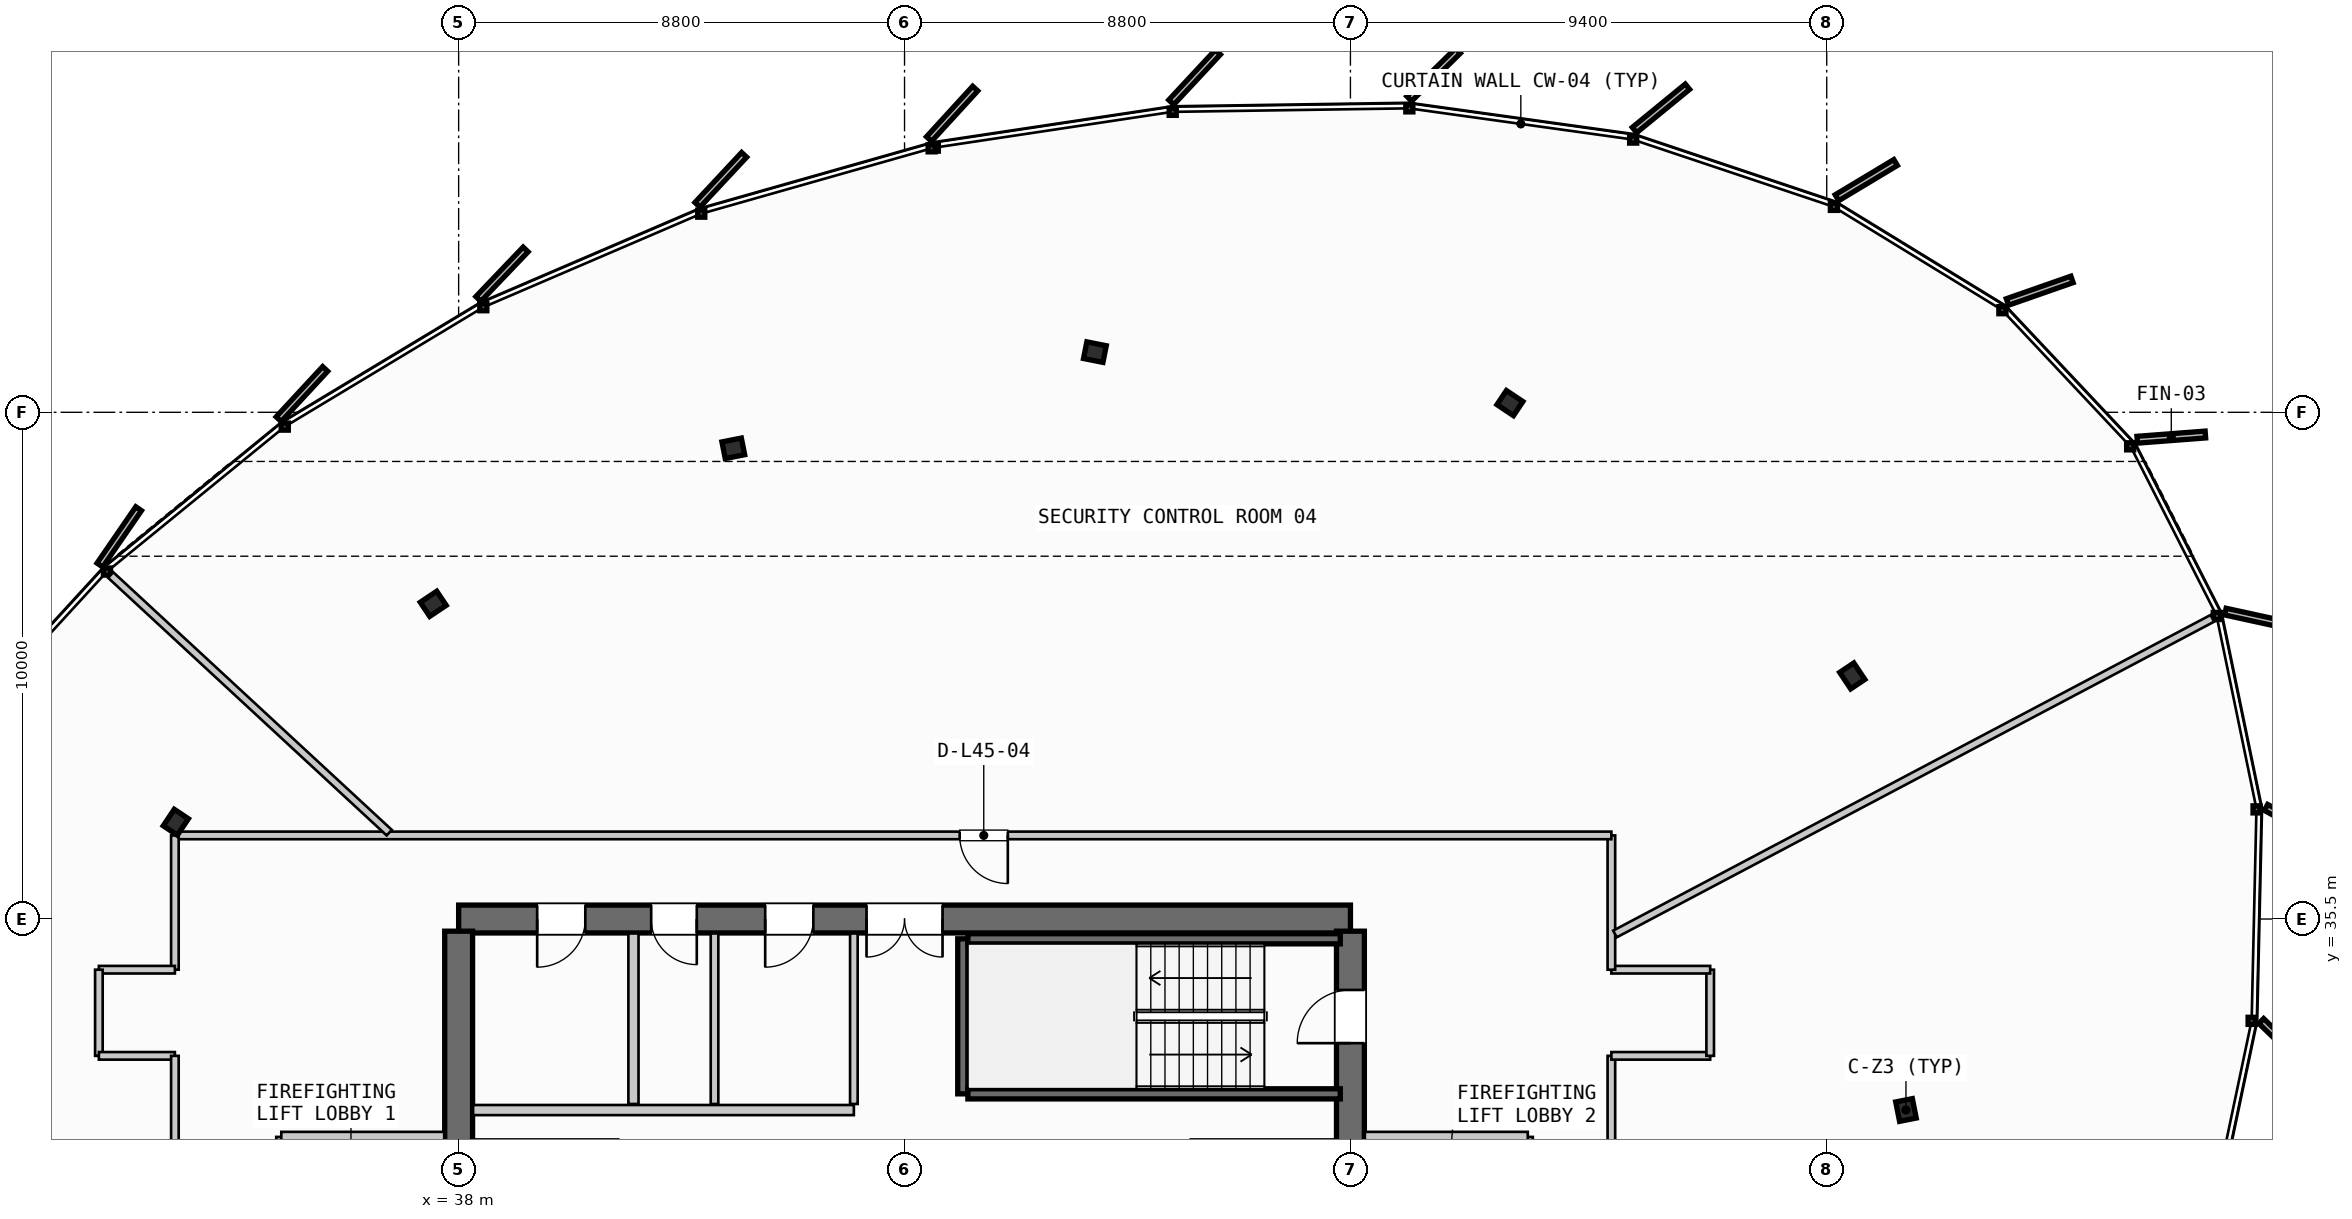
"""IFC4 building model, lengths in metres.
Left out: names, types, materials, properties, quantities, classifications, styles, units other than length and angle.
Written with IfcOpenShell. Run it as: python <this file> out.ifc"""

import sys

from ifc_helpers import new_model, si_unit, direction, frame, frame_2d, origin, origin_2d, place, context, subcontext, project, spatial, rectangle, i_section, extrude, source, transform, mapped, element, fill, save


model = new_model("IFC4")
c1 = context("Model", 3, precision=1e-05, world=origin(), true_north=direction((0.0, 1.0)))
c2 = subcontext(c1, "Body", "Model", "MODEL_VIEW")
j1 = project(units=[si_unit("LENGTHUNIT", "METRE"), si_unit("PLANEANGLEUNIT", "RADIAN")], contexts=[c1])
p1 = place(None, origin())
s1 = spatial("IfcSite", under=j1, at=p1, CompositionType="ELEMENT")
p2 = place(p1, origin())
s2 = spatial("IfcBuilding", under=s1, at=p2, CompositionType="ELEMENT")
p3 = place(p2, frame((0.0, 0.0, 176.4)))
s3 = spatial("IfcBuildingStorey", under=s2, at=p3, CompositionType="ELEMENT", Elevation=176.4)
p4 = place(p3, frame((55.6, 35.5, 0.0), z_axis=(0.0, 0.0, 1.0), x_axis=(-1.0, 0.0, 0.0)))
e1 = element("IfcWall", 1, at=p4, inside=s3, PredefinedType="SHEAR", context=c2, shape_type="SweptSolid", body=[
    extrude(rectangle(XDim=17.6, YDim=0.55, at=frame_2d((8.8, 0.0))), origin(), (0.0, 0.0, 1.0), 3.26),
])
p5 = place(p4, frame((8.05, 0.0, 0.0)))
e2 = element("IfcOpeningElement", 2, at=p5, cuts=e1, PredefinedType="OPENING", context=c2, shape_type="SweptSolid", body=[
    extrude(rectangle(XDim=1.5, YDim=2.2, at=frame_2d((0.75, 1.1))), frame((0.0, 0.285, 0.0), z_axis=(0.0, -1.0, 0.0), x_axis=(1.0, 0.0, 0.0)), (0.0, 0.0, 1.0), 0.57),
])
p6 = place(p4, frame((15.1, 0.0, 0.0)))
e3 = element("IfcOpeningElement", 3, at=p6, cuts=e1, PredefinedType="OPENING", context=c2, shape_type="SweptSolid", body=[
    extrude(rectangle(XDim=0.95, YDim=2.15, at=frame_2d((0.475, 1.075))), frame((0.0, 0.285, 0.0), z_axis=(0.0, -1.0, 0.0), x_axis=(1.0, 0.0, 0.0)), (0.0, 0.0, 1.0), 0.57),
])
p7 = place(p4, frame((12.9, 0.0, 0.0)))
e4 = element("IfcOpeningElement", 4, at=p7, cuts=e1, PredefinedType="OPENING", context=c2, shape_type="SweptSolid", body=[
    extrude(rectangle(XDim=0.9, YDim=2.15, at=frame_2d((0.45, 1.075))), frame((0.0, 0.285, 0.0), z_axis=(0.0, -1.0, 0.0), x_axis=(1.0, 0.0, 0.0)), (0.0, 0.0, 1.0), 0.57),
])
p8 = place(p4, frame((10.6, 0.0, 0.0)))
e5 = element("IfcOpeningElement", 5, at=p8, cuts=e1, PredefinedType="OPENING", context=c2, shape_type="SweptSolid", body=[
    extrude(rectangle(XDim=0.95, YDim=2.15, at=frame_2d((0.475, 1.075))), frame((0.0, 0.285, 0.0), z_axis=(0.0, -1.0, 0.0), x_axis=(1.0, 0.0, 0.0)), (0.0, 0.0, 1.0), 0.57),
])
p9 = place(p3, frame((38.0, 35.26, 0.0), z_axis=(0.0, 0.0, 1.0), x_axis=(0.0, -1.0, 0.0)))
e6 = element("IfcWall", 6, at=p9, inside=s3, PredefinedType="SHEAR", context=c2, shape_type="SweptSolid", body=[
    extrude(rectangle(XDim=14.92, YDim=0.55, at=frame_2d((7.46, 0.0))), origin(), (0.0, 0.0, 1.0), 3.26),
])
p10 = place(p9, frame((5.21, 0.0, 0.0)))
e7 = element("IfcOpeningElement", 7, at=p10, cuts=e6, PredefinedType="OPENING", context=c2, shape_type="SweptSolid", body=[
    extrude(rectangle(XDim=1.1, YDim=2.2, at=frame_2d((0.55, 1.1))), frame((0.0, 0.285, 0.0), z_axis=(0.0, -1.0, 0.0), x_axis=(1.0, 0.0, 0.0)), (0.0, 0.0, 1.0), 0.57),
])
p11 = place(p3, frame((55.6, 20.34, 0.0), z_axis=(0.0, 0.0, 1.0), x_axis=(0.0, 1.0, 0.0)))
e8 = element("IfcWall", 8, at=p11, inside=s3, PredefinedType="SHEAR", context=c2, shape_type="SweptSolid", body=[
    extrude(rectangle(XDim=14.92, YDim=0.55, at=frame_2d((7.46, 0.0))), origin(), (0.0, 0.0, 1.0), 3.26),
])
p12 = place(p11, frame((12.71, 0.0, 0.0)))
e9 = element("IfcOpeningElement", 9, at=p12, cuts=e8, PredefinedType="OPENING", context=c2, shape_type="SweptSolid", body=[
    extrude(rectangle(XDim=1.05, YDim=2.15, at=frame_2d((0.525, 1.075))), frame((0.0, 0.285, 0.0), z_axis=(0.0, -1.0, 0.0), x_axis=(1.0, 0.0, 0.0)), (0.0, 0.0, 1.0), 0.57),
])
p13 = place(p11, frame((8.61, 0.0, 0.0)))
e10 = element("IfcOpeningElement", 10, at=p13, cuts=e8, PredefinedType="OPENING", context=c2, shape_type="SweptSolid", body=[
    extrude(rectangle(XDim=1.1, YDim=2.2, at=frame_2d((0.55, 1.1))), frame((0.0, 0.285, 0.0), z_axis=(0.0, -1.0, 0.0), x_axis=(1.0, 0.0, 0.0)), (0.0, 0.0, 1.0), 0.57),
])
m1 = source(origin(), c2, "Body", "SweptSolid", [
    extrude(i_section(OverallWidth=0.391, OverallDepth=0.335, WebThickness=0.023, FlangeThickness=0.034, FilletRadius=0.015, at=origin_2d()), origin(), (0.0, 0.0, 1.0), 3.26),
])
for number, where, z_axis, x_axis in (
    (11, (66.564, 31.731, 0.0), (0.0, 0.0, 1.0), (0.981, 0.195, 0.0)),
    (12, (65.504, 40.298, 0.0), (0.0, 0.0, 1.0), (0.831, 0.556, 0.0)),
    (13, (58.748, 45.681, 0.0), (0.0, 0.0, 1.0), (0.556, 0.831, 0.0)),
    (14, (50.557, 46.688, 0.0), (0.0, 0.0, 1.0), (0.195, 0.981, 0.0)),
    (15, (43.421, 44.789, 0.0), (0.0, 0.0, 1.0), (-0.195, 0.981, 0.0)),
    (16, (37.499, 41.72, 0.0), (0.0, 0.0, 1.0), (-0.556, 0.831, 0.0)),
    (17, (32.418, 37.409, 0.0), (0.0, 0.0, 1.0), (-0.831, 0.556, 0.0)),
):
    element("IfcColumn", number, at=place(p3, frame(where, z_axis=z_axis, x_axis=x_axis)), inside=s3, PredefinedType="COLUMN", context=c2, shape_type="MappedRepresentation", body=[
        mapped(m1, transform((0.0, 0.0, 0.0), scale=1.0)),
    ])
p14 = place(p3, frame((47.95, 32.05, 0.0), z_axis=(0.0, 0.0, 1.0), x_axis=(0.0, 1.0, 0.0)))
e18 = element("IfcWall", 18, at=p14, inside=s3, PredefinedType="SHEAR", context=c2, shape_type="SweptSolid", body=[
    extrude(rectangle(XDim=3.06, YDim=0.2, at=frame_2d((1.53, 0.0))), origin(), (0.0, 0.0, 1.0), 3.26),
])
for number, where, z_axis, x_axis in (
    (19, (48.05, 35.11, 0.0), (0.0, 0.0, 1.0), (1.0, 0.0, 0.0)),
    (20, (55.4, 32.05, 0.0), (0.0, 0.0, 1.0), (-1.0, 0.0, 0.0)),
):
    element("IfcWall", number, at=place(p3, frame(where, z_axis=z_axis, x_axis=x_axis)), inside=s3, PredefinedType="SHEAR", context=c2, shape_type="SweptSolid", body=[
        extrude(rectangle(XDim=7.35, YDim=0.2, at=frame_2d((3.675, 0.0))), origin(), (0.0, 0.0, 1.0), 3.26),
    ])
p15 = place(p3, frame((38.285, 31.05, 0.0), z_axis=(0.0, 0.0, 1.0), x_axis=(1.0, 0.0, 0.0)))
e21 = element("IfcWall", 21, at=p15, inside=s3, PredefinedType="PARTITIONING", context=c2, shape_type="SweptSolid", body=[
    extrude(rectangle(XDim=2.865, YDim=0.2, at=frame_2d((1.433, 0.0))), origin(), (0.0, 0.0, 1.0), 2.28),
])
p16 = place(p3, frame((34.5, 31.2, 0.0), z_axis=(0.0, 0.0, 1.0), x_axis=(0.0, -1.0, 0.0)))
e22 = element("IfcWall", 22, at=p16, inside=s3, PredefinedType="PARTITIONING", context=c2, shape_type="SweptSolid", body=[
    extrude(rectangle(XDim=4.4, YDim=0.2, at=frame_2d((2.2, 0.0))), origin(), (0.0, 0.0, 1.0), 2.28),
])
p17 = place(p16, frame((1.65, 0.0, 0.0)))
e23 = element("IfcOpeningElement", 23, at=p17, cuts=e22, PredefinedType="OPENING", context=c2, shape_type="SweptSolid", body=[
    extrude(rectangle(XDim=1.05, YDim=2.15, at=frame_2d((0.525, 1.075))), frame((0.0, 0.11, 0.0), z_axis=(0.0, -1.0, 0.0), x_axis=(1.0, 0.0, 0.0)), (0.0, 0.0, 1.0), 0.22),
])
p18 = place(p3, frame((34.5, 31.2, 0.0), z_axis=(0.0, 0.0, 1.0), x_axis=(1.0, 0.0, 0.0)))
e24 = element("IfcWall", 24, at=p18, inside=s3, PredefinedType="PARTITIONING", context=c2, shape_type="SweptSolid", body=[
    extrude(rectangle(XDim=3.215, YDim=0.2, at=frame_2d((1.607, 0.0))), origin(), (0.0, 0.0, 1.0), 2.28),
])
p19 = place(p3, frame((52.45, 31.05, 0.0), z_axis=(0.0, 0.0, 1.0), x_axis=(1.0, 0.0, 0.0)))
e25 = element("IfcWall", 25, at=p19, inside=s3, PredefinedType="PARTITIONING", context=c2, shape_type="SweptSolid", body=[
    extrude(rectangle(XDim=2.865, YDim=0.2, at=frame_2d((1.433, 0.0))), origin(), (0.0, 0.0, 1.0), 2.28),
])
p20 = place(p3, frame((59.1, 26.8, 0.0), z_axis=(0.0, 0.0, 1.0), x_axis=(0.0, 1.0, 0.0)))
e26 = element("IfcWall", 26, at=p20, inside=s3, PredefinedType="PARTITIONING", context=c2, shape_type="SweptSolid", body=[
    extrude(rectangle(XDim=4.4, YDim=0.2, at=frame_2d((2.2, 0.0))), origin(), (0.0, 0.0, 1.0), 2.28),
])
p21 = place(p20, frame((1.65, 0.0, 0.0)))
e27 = element("IfcOpeningElement", 27, at=p21, cuts=e26, PredefinedType="OPENING", context=c2, shape_type="SweptSolid", body=[
    extrude(rectangle(XDim=1.05, YDim=2.15, at=frame_2d((0.525, 1.075))), frame((0.0, 0.11, 0.0), z_axis=(0.0, -1.0, 0.0), x_axis=(1.0, 0.0, 0.0)), (0.0, 0.0, 1.0), 0.22),
])
p22 = place(p3, frame((55.885, 31.2, 0.0), z_axis=(0.0, 0.0, 1.0), x_axis=(1.0, 0.0, 0.0)))
e28 = element("IfcWall", 28, at=p22, inside=s3, PredefinedType="PARTITIONING", context=c2, shape_type="SweptSolid", body=[
    extrude(rectangle(XDim=3.215, YDim=0.2, at=frame_2d((1.607, 0.0))), origin(), (0.0, 0.0, 1.0), 2.28),
])
p23 = place(p3, frame((41.45, 31.85, 0.0), z_axis=(0.0, 0.0, 1.0), x_axis=(0.0, 1.0, 0.0)))
e29 = element("IfcWall", 29, at=p23, inside=s3, PredefinedType="PARTITIONING", context=c2, shape_type="SweptSolid", body=[
    extrude(rectangle(XDim=3.365, YDim=0.2, at=frame_2d((1.683, 0.0))), origin(), (0.0, 0.0, 1.0), 2.28),
])
p24 = place(p3, frame((38.285, 31.73, 0.0), z_axis=(0.0, 0.0, 1.0), x_axis=(1.0, 0.0, 0.0)))
e30 = element("IfcWall", 30, at=p24, inside=s3, PredefinedType="PARTITIONING", context=c2, shape_type="SweptSolid", body=[
    extrude(rectangle(XDim=7.515, YDim=0.2, at=frame_2d((3.758, 0.0))), origin(), (0.0, 0.0, 1.0), 2.28),
])
p25 = place(p3, frame((45.8, 31.85, 0.0), z_axis=(0.0, 0.0, 1.0), x_axis=(0.0, 1.0, 0.0)))
e31 = element("IfcWall", 31, at=p25, inside=s3, PredefinedType="PARTITIONING", context=c2, shape_type="SweptSolid", body=[
    extrude(rectangle(XDim=3.365, YDim=0.15, at=frame_2d((1.683, 0.0))), origin(), (0.0, 0.0, 1.0), 2.28),
])
p26 = place(p3, frame((43.05, 31.85, 0.0), z_axis=(0.0, 0.0, 1.0), x_axis=(0.0, 1.0, 0.0)))
e32 = element("IfcWall", 32, at=p26, inside=s3, PredefinedType="PLUMBINGWALL", context=c2, shape_type="SweptSolid", body=[
    extrude(rectangle(XDim=3.365, YDim=0.15, at=frame_2d((1.683, 0.0))), origin(), (0.0, 0.0, 1.0), 2.28),
])
p27 = place(p3, frame((60.75, 22.8, 0.0), z_axis=(0.0, 0.0, 1.0), x_axis=(0.0, 1.0, 0.0)))
e33 = element("IfcWall", 33, at=p27, inside=s3, PredefinedType="PARTITIONING", context=c2, shape_type="SweptSolid", body=[
    extrude(rectangle(XDim=10.0, YDim=0.15, at=frame_2d((5.0, 0.0))), origin(), (0.0, 0.0, 1.0), 2.28),
])
p28 = place(p27, frame((4.525, 0.0, 0.0)))
e34 = element("IfcOpeningElement", 34, at=p28, cuts=e33, PredefinedType="OPENING", context=c2, shape_type="SweptSolid", body=[
    extrude(rectangle(XDim=0.95, YDim=2.15, at=frame_2d((0.475, 1.075))), frame((0.0, 0.085, 0.0), z_axis=(0.0, -1.0, 0.0), x_axis=(1.0, 0.0, 0.0)), (0.0, 0.0, 1.0), 0.17),
])
p29 = place(p3, frame((60.75, 32.8, 0.0), z_axis=(0.0, 0.0, 1.0), x_axis=(1.0, 0.0, 0.0)))
e35 = element("IfcWall", 35, at=p29, inside=s3, PredefinedType="PARTITIONING", context=c2, shape_type="SweptSolid", body=[
    extrude(rectangle(XDim=1.95, YDim=0.15, at=frame_2d((0.975, 0.0))), origin(), (0.0, 0.0, 1.0), 2.28),
])
p30 = place(p3, frame((62.7, 32.8, 0.0), z_axis=(0.0, 0.0, 1.0), x_axis=(0.0, 1.0, 0.0)))
e36 = element("IfcWall", 36, at=p30, inside=s3, PredefinedType="PARTITIONING", context=c2, shape_type="SweptSolid", body=[
    extrude(rectangle(XDim=1.7, YDim=0.15, at=frame_2d((0.85, 0.0))), origin(), (0.0, 0.0, 1.0), 2.28),
])
p31 = place(p3, frame((62.7, 34.5, 0.0), z_axis=(0.0, 0.0, 1.0), x_axis=(-1.0, 0.0, 0.0)))
e37 = element("IfcWall", 37, at=p31, inside=s3, PredefinedType="PARTITIONING", context=c2, shape_type="SweptSolid", body=[
    extrude(rectangle(XDim=1.95, YDim=0.15, at=frame_2d((0.975, 0.0))), origin(), (0.0, 0.0, 1.0), 2.28),
])
p32 = place(p3, frame((60.75, 34.5, 0.0), z_axis=(0.0, 0.0, 1.0), x_axis=(0.0, 1.0, 0.0)))
e38 = element("IfcWall", 38, at=p32, inside=s3, PredefinedType="PARTITIONING", context=c2, shape_type="SweptSolid", body=[
    extrude(rectangle(XDim=2.65, YDim=0.15, at=frame_2d((1.325, 0.0))), origin(), (0.0, 0.0, 1.0), 2.28),
])
p33 = place(p3, frame((60.75, 37.15, 0.0), z_axis=(0.0, 0.0, 1.0), x_axis=(-1.0, 0.0, 0.0)))
e39 = element("IfcWall", 39, at=p33, inside=s3, PredefinedType="PARTITIONING", context=c2, shape_type="SweptSolid", body=[
    extrude(rectangle(XDim=28.35, YDim=0.15, at=frame_2d((14.175, 0.0))), origin(), (0.0, 0.0, 1.0), 2.28),
])
p34 = place(p33, frame((11.912, 0.0, 0.0)))
e40 = element("IfcOpeningElement", 40, at=p34, cuts=e39, PredefinedType="OPENING", context=c2, shape_type="SweptSolid", body=[
    extrude(rectangle(XDim=0.95, YDim=2.15, at=frame_2d((0.475, 1.075))), frame((0.0, 0.085, 0.0), z_axis=(0.0, -1.0, 0.0), x_axis=(1.0, 0.0, 0.0)), (0.0, 0.0, 1.0), 0.17),
])
p35 = place(p3, frame((32.4, 37.15, 0.0), z_axis=(0.0, 0.0, 1.0), x_axis=(0.0, -1.0, 0.0)))
e41 = element("IfcWall", 41, at=p35, inside=s3, PredefinedType="PARTITIONING", context=c2, shape_type="SweptSolid", body=[
    extrude(rectangle(XDim=2.65, YDim=0.15, at=frame_2d((1.325, 0.0))), origin(), (0.0, 0.0, 1.0), 2.28),
])
p36 = place(p3, frame((32.4, 34.5, 0.0), z_axis=(0.0, 0.0, 1.0), x_axis=(-1.0, 0.0, 0.0)))
e42 = element("IfcWall", 42, at=p36, inside=s3, PredefinedType="PARTITIONING", context=c2, shape_type="SweptSolid", body=[
    extrude(rectangle(XDim=1.5, YDim=0.15, at=frame_2d((0.75, 0.0))), origin(), (0.0, 0.0, 1.0), 2.28),
])
p37 = place(p3, frame((30.9, 34.5, 0.0), z_axis=(0.0, 0.0, 1.0), x_axis=(0.0, -1.0, 0.0)))
e43 = element("IfcWall", 43, at=p37, inside=s3, PredefinedType="PARTITIONING", context=c2, shape_type="SweptSolid", body=[
    extrude(rectangle(XDim=1.7, YDim=0.15, at=frame_2d((0.85, 0.0))), origin(), (0.0, 0.0, 1.0), 2.28),
])
p38 = place(p3, frame((30.9, 32.8, 0.0), z_axis=(0.0, 0.0, 1.0), x_axis=(1.0, 0.0, 0.0)))
e44 = element("IfcWall", 44, at=p38, inside=s3, PredefinedType="PARTITIONING", context=c2, shape_type="SweptSolid", body=[
    extrude(rectangle(XDim=1.5, YDim=0.15, at=frame_2d((0.75, 0.0))), origin(), (0.0, 0.0, 1.0), 2.28),
])
p39 = place(p3, frame((32.4, 32.8, 0.0), z_axis=(0.0, 0.0, 1.0), x_axis=(0.0, -1.0, 0.0)))
e45 = element("IfcWall", 45, at=p39, inside=s3, PredefinedType="PARTITIONING", context=c2, shape_type="SweptSolid", body=[
    extrude(rectangle(XDim=10.0, YDim=0.15, at=frame_2d((5.0, 0.0))), origin(), (0.0, 0.0, 1.0), 2.28),
])
p40 = place(p39, frame((4.525, 0.0, 0.0)))
e46 = element("IfcOpeningElement", 46, at=p40, cuts=e45, PredefinedType="OPENING", context=c2, shape_type="SweptSolid", body=[
    extrude(rectangle(XDim=0.95, YDim=2.15, at=frame_2d((0.475, 1.075))), frame((0.0, 0.085, 0.0), z_axis=(0.0, -1.0, 0.0), x_axis=(1.0, 0.0, 0.0)), (0.0, 0.0, 1.0), 0.17),
])
p41 = place(p3, frame((60.821, 35.205, 0.0), z_axis=(0.0, 0.0, 1.0), x_axis=(0.884187105587, 0.467132917181, 0.0)))
e47 = element("IfcWall", 47, at=p41, inside=s3, PredefinedType="PARTITIONING", context=c2, shape_type="SweptSolid", body=[
    extrude(rectangle(XDim=13.333, YDim=0.15, at=frame_2d((6.667, 0.0))), origin(), (0.0, 0.0, 1.0), 2.28),
])
p42 = place(p3, frame((36.63, 37.204, 0.0), z_axis=(0.0, 0.0, 1.0), x_axis=(-0.734135600116, 0.679002887064, 0.0)))
e48 = element("IfcWall", 48, at=p42, inside=s3, PredefinedType="PARTITIONING", context=c2, shape_type="SweptSolid", body=[
    extrude(rectangle(XDim=7.488, YDim=0.15, at=frame_2d((3.744, 0.0))), origin(), (0.0, 0.0, 1.0), 2.28),
])
m2 = source(origin(), c2, "Body", "SweptSolid", [
    extrude(rectangle(XDim=1.05, YDim=2.15, at=frame_2d((0.525, 1.075))), frame((0.0, 0.025, 0.0), z_axis=(0.0, -1.0, 0.0), x_axis=(1.0, 0.0, 0.0)), (0.0, 0.0, 1.0), 0.05),
])
p43 = place(p12, origin())
e49 = element("IfcDoor", 49, at=p43, inside=s3, OperationType="SINGLE_SWING_LEFT", PredefinedType="DOOR", context=c2, shape_type="MappedRepresentation", body=[
    mapped(m2, transform((0.0, 0.0, 0.0), scale=1.0)),
])
fill(e9, e49)
m3 = source(origin(), c2, "Body", "SweptSolid", [
    extrude(rectangle(XDim=1.5, YDim=2.2, at=frame_2d((0.75, 1.1))), frame((0.0, 0.025, 0.0), z_axis=(0.0, -1.0, 0.0), x_axis=(1.0, 0.0, 0.0)), (0.0, 0.0, 1.0), 0.05),
])
p44 = place(p5, origin())
e50 = element("IfcDoor", 50, at=p44, inside=s3, OperationType="DOUBLE_DOOR_SINGLE_SWING", PredefinedType="DOOR", context=c2, shape_type="MappedRepresentation", body=[
    mapped(m3, transform((0.0, 0.0, 0.0), scale=1.0)),
])
fill(e2, e50)
m4 = source(origin(), c2, "Body", "SweptSolid", [
    extrude(rectangle(XDim=0.95, YDim=2.15, at=frame_2d((0.475, 1.075))), frame((0.0, 0.025, 0.0), z_axis=(0.0, -1.0, 0.0), x_axis=(1.0, 0.0, 0.0)), (0.0, 0.0, 1.0), 0.05),
])
p45 = place(p6, origin())
e51 = element("IfcDoor", 51, at=p45, inside=s3, OperationType="SINGLE_SWING_RIGHT", PredefinedType="DOOR", context=c2, shape_type="MappedRepresentation", body=[
    mapped(m4, transform((0.0, 0.0, 0.0), scale=1.0)),
])
fill(e3, e51)
m5 = source(origin(), c2, "Body", "SweptSolid", [
    extrude(rectangle(XDim=0.9, YDim=2.15, at=frame_2d((0.45, 1.075))), frame((0.0, 0.025, 0.0), z_axis=(0.0, -1.0, 0.0), x_axis=(1.0, 0.0, 0.0)), (0.0, 0.0, 1.0), 0.05),
])
p46 = place(p7, origin())
e52 = element("IfcDoor", 52, at=p46, inside=s3, OperationType="SINGLE_SWING_LEFT", PredefinedType="DOOR", context=c2, shape_type="MappedRepresentation", body=[
    mapped(m5, transform((0.0, 0.0, 0.0), scale=1.0)),
])
fill(e4, e52)
p47 = place(p8, origin())
e53 = element("IfcDoor", 53, at=p47, inside=s3, OperationType="SINGLE_SWING_RIGHT", PredefinedType="DOOR", context=c2, shape_type="MappedRepresentation", body=[
    mapped(m4, transform((0.0, 0.0, 0.0), scale=1.0)),
])
fill(e5, e53)
p48 = place(p34, origin())
e54 = element("IfcDoor", 54, at=p48, inside=s3, OperationType="SINGLE_SWING_LEFT", PredefinedType="DOOR", context=c2, shape_type="MappedRepresentation", body=[
    mapped(m4, transform((0.0, 0.0, 0.0), scale=1.0)),
])
fill(e40, e54)
save(model, sys.argv[1])
